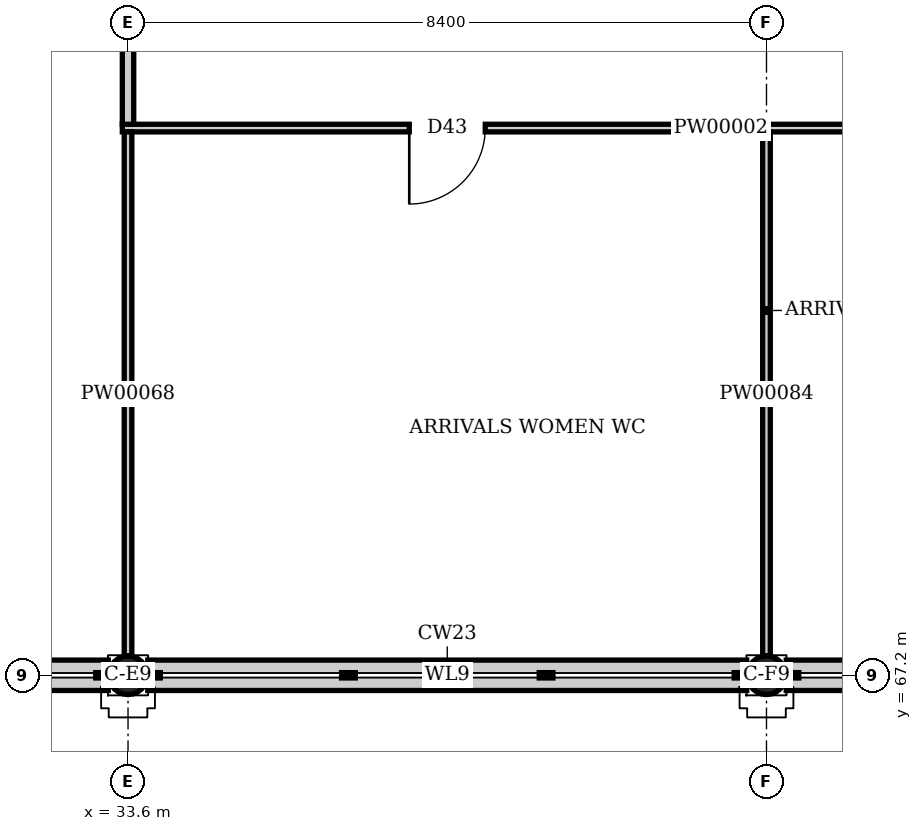
"""IFC4 building model, lengths in metres.
Left out: names, types, materials, properties, quantities, classifications, styles, units other than length and angle.
Written with IfcOpenShell. Run it as: python <this file> out.ifc"""

import sys

from ifc_helpers import new_model, si_unit, direction, frame, frame_2d, origin, origin_2d, place, context, subcontext, project, spatial, rectangle, hollow_circle, extrude, element, fill, save


model = new_model("IFC4")
c1 = context("Model", 3, precision=1e-05, world=origin(), true_north=direction((0.0, 1.0)))
c2 = subcontext(c1, "Body", "Model", "MODEL_VIEW")
j1 = project(units=[si_unit("LENGTHUNIT", "METRE"), si_unit("PLANEANGLEUNIT", "RADIAN")], contexts=[c1])
p1 = place(None, origin())
s1 = spatial("IfcSite", under=j1, at=p1, CompositionType="ELEMENT")
p2 = place(p1, origin())
s2 = spatial("IfcBuilding", under=s1, at=p2, CompositionType="ELEMENT")
p3 = place(p2, origin())
s3 = spatial("IfcBuildingStorey", under=s2, at=p3, CompositionType="ELEMENT", Elevation=0.0)
for number, where, z_axis, x_axis in (
    (1, (33.6, 67.2, -0.7), (0.0, 0.0, 1.0), (1.0, 0.0, 0.0)),
    (2, (42.0, 67.2, -0.7), (0.0, 0.0, 1.0), (1.0, 0.0, 0.0)),
):
    element("IfcColumn", number, at=place(p3, frame(where, z_axis=z_axis, x_axis=x_axis)), inside=s3, PredefinedType="COLUMN", context=c2, shape_type="SweptSolid", body=[
        extrude(hollow_circle(Radius=0.254, WallThickness=0.016, at=origin_2d()), origin(), (0.0, 0.0, 1.0), 6.7),
    ])
p4 = place(p3, frame((25.46, 67.2, 0.0), z_axis=(0.0, 0.0, 1.0), x_axis=(1.0, 0.0, 0.0)))
e3 = element("IfcWall", 3, at=p4, inside=s3, PredefinedType="SOLIDWALL", context=c2, shape_type="SweptSolid", body=[
    extrude(rectangle(XDim=7.88, YDim=0.4, at=frame_2d((3.94, 0.0))), origin(), (0.0, 0.0, 1.0), 1.2),
])
for number, where, z_axis, x_axis in (
    (4, (33.86, 67.2, 0.0), (0.0, 0.0, 1.0), (1.0, 0.0, 0.0)),
    (5, (42.26, 67.2, 0.0), (0.0, 0.0, 1.0), (1.0, 0.0, 0.0)),
):
    element("IfcWall", number, at=place(p3, frame(where, z_axis=z_axis, x_axis=x_axis)), inside=s3, PredefinedType="SOLIDWALL", context=c2, shape_type="SweptSolid", body=[
        extrude(rectangle(XDim=7.88, YDim=0.4, at=frame_2d((3.94, 0.0))), origin(), (0.0, 0.0, 1.0), 1.2),
    ])
p5 = place(p3, frame((33.525, 74.4, 0.0), z_axis=(0.0, 0.0, 1.0), x_axis=(1.0, 0.0, 0.0)))
e6 = element("IfcWall", 6, at=p5, inside=s3, PredefinedType="PARTITIONING", context=c2, shape_type="SweptSolid", body=[
    extrude(rectangle(XDim=16.95, YDim=0.1, at=frame_2d((8.475, 0.0))), origin(), (0.0, 0.0, 1.0), 10.8),
])
p6 = place(p5, frame((3.775, 0.0, 0.0)))
e7 = element("IfcOpeningElement", 7, at=p6, cuts=e6, PredefinedType="OPENING", context=c2, shape_type="SweptSolid", body=[
    extrude(rectangle(XDim=1.0, YDim=2.1, at=frame_2d((0.5, 1.05))), frame((0.0, 0.06, 0.0), z_axis=(0.0, -1.0, 0.0), x_axis=(1.0, 0.0, 0.0)), (0.0, 0.0, 1.0), 0.12),
])
p7 = place(p5, frame((10.975, 0.0, 0.0)))
e8 = element("IfcOpeningElement", 8, at=p7, cuts=e6, PredefinedType="OPENING", context=c2, shape_type="SweptSolid", body=[
    extrude(rectangle(XDim=1.0, YDim=2.1, at=frame_2d((0.5, 1.05))), frame((0.0, 0.06, 0.0), z_axis=(0.0, -1.0, 0.0), x_axis=(1.0, 0.0, 0.0)), (0.0, 0.0, 1.0), 0.12),
])
p8 = place(p5, frame((15.175, 0.0, 0.0)))
e9 = element("IfcOpeningElement", 9, at=p8, cuts=e6, PredefinedType="OPENING", context=c2, shape_type="SweptSolid", body=[
    extrude(rectangle(XDim=1.0, YDim=2.1, at=frame_2d((0.5, 1.05))), frame((0.0, 0.06, 0.0), z_axis=(0.0, -1.0, 0.0), x_axis=(1.0, 0.0, 0.0)), (0.0, 0.0, 1.0), 0.12),
])
p9 = place(p3, frame((33.6, 67.454, 0.0), z_axis=(0.0, 0.0, 1.0), x_axis=(0.0, 1.0, 0.0)))
e10 = element("IfcWall", 10, at=p9, inside=s3, PredefinedType="PARTITIONING", context=c2, shape_type="SweptSolid", body=[
    extrude(rectangle(XDim=6.896, YDim=0.1, at=frame_2d((3.448, 0.0))), origin(), (0.0, 0.0, 1.0), 10.338),
])
p10 = place(p3, frame((33.6, 74.45, 0.0), z_axis=(0.0, 0.0, 1.0), x_axis=(0.0, 1.0, 0.0)))
e11 = element("IfcWall", 11, at=p10, inside=s3, PredefinedType="PARTITIONING", context=c2, shape_type="SweptSolid", body=[
    extrude(rectangle(XDim=2.275, YDim=0.15, at=frame_2d((1.138, 0.0))), origin(), (0.0, 0.0, 1.0), 10.338),
])
p11 = place(p3, frame((42.0, 67.454, 0.0), z_axis=(0.0, 0.0, 1.0), x_axis=(0.0, 1.0, 0.0)))
e12 = element("IfcWall", 12, at=p11, inside=s3, PredefinedType="PARTITIONING", context=c2, shape_type="SweptSolid", body=[
    extrude(rectangle(XDim=6.896, YDim=0.1, at=frame_2d((3.448, 0.0))), origin(), (0.0, 0.0, 1.0), 10.338),
])
p12 = place(p6, frame((1.0, 0.0, 0.0), z_axis=(0.0, 0.0, 1.0), x_axis=(-1.0, 0.0, 0.0)))
e13 = element("IfcDoor", 13, at=p12, inside=s3, OperationType="SINGLE_SWING_RIGHT", PredefinedType="DOOR", context=c2, shape_type="SweptSolid", body=[
    extrude(rectangle(XDim=1.0, YDim=2.1, at=frame_2d((0.5, 1.05))), frame((0.0, 0.025, 0.0), z_axis=(0.0, -1.0, 0.0), x_axis=(1.0, 0.0, 0.0)), (0.0, 0.0, 1.0), 0.05),
])
fill(e7, e13)
save(model, sys.argv[1])
